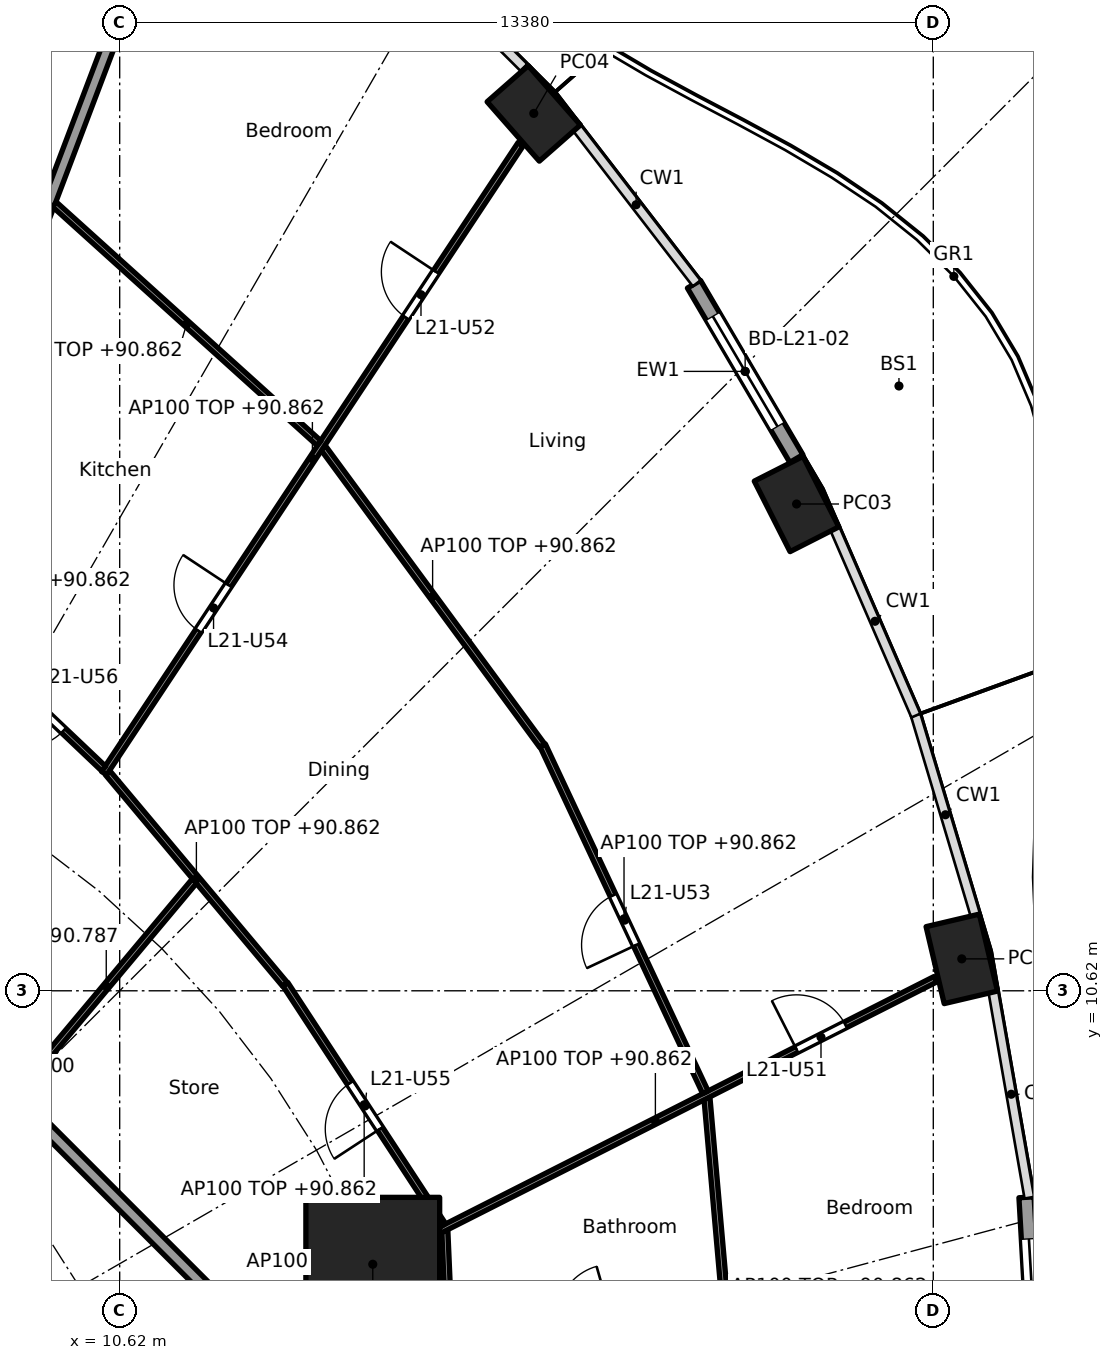
"""IFC4 building model, lengths in metres.
Left out: names, types, materials, properties, quantities, classifications, styles, units other than length and angle.
Written with IfcOpenShell. Run it as: python <this file> out.ifc"""

import sys

from ifc_helpers import new_model, si_unit, direction, frame, frame_2d, origin, origin_2d, place, context, subcontext, project, spatial, rectangle, hollow_rectangle, extrude, element, fill, save


model = new_model("IFC4")
c1 = context("Model", 3, precision=1e-05, world=origin(), true_north=direction((0.0, 1.0)))
c2 = subcontext(c1, "Body", "Model", "MODEL_VIEW")
j1 = project(units=[si_unit("LENGTHUNIT", "METRE"), si_unit("PLANEANGLEUNIT", "RADIAN")], contexts=[c1])
p1 = place(None, origin())
s1 = spatial("IfcSite", under=j1, at=p1, CompositionType="ELEMENT")
p2 = place(p1, origin())
s2 = spatial("IfcBuilding", under=s1, at=p2, CompositionType="ELEMENT")
p3 = place(p2, frame((0.0, 0.0, 88.1)))
s3 = spatial("IfcBuildingStorey", under=s2, at=p3, CompositionType="ELEMENT", Elevation=88.1)
for number, where, z_axis, x_axis in (
    (1, (24.468, 11.145, 0.0), (0.0, 0.0, 1.0), (-0.229, 0.973, 0.0)),
    (2, (21.751, 18.625, 0.0), (0.0, 0.0, 1.0), (-0.452, 0.892, 0.0)),
    (3, (17.43, 25.049, 0.0), (0.0, 0.0, 1.0), (-0.66, 0.751, 0.0)),
):
    element("IfcColumn", number, at=place(p3, frame(where, z_axis=z_axis, x_axis=x_axis)), inside=s3, PredefinedType="COLUMN", context=c2, shape_type="SweptSolid", body=[
        extrude(hollow_rectangle(XDim=1.3, YDim=0.9, WallThickness=0.045, at=origin_2d()), origin(), (0.0, 0.0, 1.0), 3.7),
    ])
p4 = place(p3, frame((14.782, 6.123, 0.0), z_axis=(0.0, 0.0, 1.0), x_axis=(1.0, 0.0, 0.0)))
e4 = element("IfcColumn", 4, at=p4, inside=s3, PredefinedType="COLUMN", context=c2, shape_type="SweptSolid", body=[
    extrude(rectangle(XDim=2.2, YDim=2.2, at=origin_2d()), origin(), (0.0, 0.0, 1.0), 3.7),
])
p5 = place(p3, frame((25.533, 7.224, 0.0), z_axis=(0.0, 0.0, 1.0), x_axis=(0.057546644052, -0.998342818754, 0.0)))
e5 = element("IfcWall", 5, at=p5, inside=s3, PredefinedType="SOLIDWALL", context=c2, shape_type="SweptSolid", body=[
    extrude(rectangle(XDim=3.47, YDim=0.25, at=frame_2d((1.735, 0.0))), origin(), (0.0, 0.0, 1.0), 3.44),
])
p6 = place(p5, frame((0.685, 0.0, 0.0)))
e6 = element("IfcOpeningElement", 6, at=p6, cuts=e5, PredefinedType="OPENING", context=c2, shape_type="SweptSolid", body=[
    extrude(rectangle(XDim=2.1, YDim=2.4, at=frame_2d((1.05, 1.2))), frame((0.0, 0.135, 0.0), z_axis=(0.0, -1.0, 0.0), x_axis=(1.0, 0.0, 0.0)), (0.0, 0.0, 1.0), 0.27),
])
p7 = place(p3, frame((20.064, 22.24, 0.0), z_axis=(0.0, 0.0, 1.0), x_axis=(0.506297921217, -0.862358634775, 0.0)))
e7 = element("IfcWall", 7, at=p7, inside=s3, PredefinedType="SOLIDWALL", context=c2, shape_type="SweptSolid", body=[
    extrude(rectangle(XDim=3.325, YDim=0.25, at=frame_2d((1.662, 0.0))), origin(), (0.0, 0.0, 1.0), 3.44),
])
p8 = place(p7, frame((0.612, 0.0, 0.0)))
e8 = element("IfcOpeningElement", 8, at=p8, cuts=e7, PredefinedType="OPENING", context=c2, shape_type="SweptSolid", body=[
    extrude(rectangle(XDim=2.1, YDim=2.4, at=frame_2d((1.05, 1.2))), frame((0.0, 0.135, 0.0), z_axis=(0.0, -1.0, 0.0), x_axis=(1.0, 0.0, 0.0)), (0.0, 0.0, 1.0), 0.27),
])
p9 = place(p3, frame((9.988, 4.613, 0.0), z_axis=(0.0, 0.0, 1.0), x_axis=(-0.707106781187, 0.707106781187, 0.0)))
e9 = element("IfcWall", 9, at=p9, inside=s3, PredefinedType="SHEAR", context=c2, shape_type="SweptSolid", body=[
    extrude(rectangle(XDim=7.602, YDim=0.6, at=frame_2d((3.801, 0.0))), origin(), (0.0, 0.0, 1.0), 3.44),
])
p10 = place(p9, frame((3.201, 0.0, 0.0)))
e10 = element("IfcOpeningElement", 10, at=p10, cuts=e9, PredefinedType="OPENING", context=c2, shape_type="SweptSolid", body=[
    extrude(rectangle(XDim=1.2, YDim=2.1, at=frame_2d((0.6, 1.05))), frame((0.0, 0.31, 0.0), z_axis=(0.0, -1.0, 0.0), x_axis=(1.0, 0.0, 0.0)), (0.0, 0.0, 1.0), 0.62),
])
p11 = place(p3, frame((6.141, 14.829, 0.0), z_axis=(0.0, 0.0, 1.0), x_axis=(0.354477134193, 0.935064682968, 0.0)))
e11 = element("IfcWall", 11, at=p11, inside=s3, PredefinedType="PARTITIONING", context=c2, shape_type="SweptSolid", body=[
    extrude(rectangle(XDim=15.626, YDim=0.2, at=frame_2d((7.813, 0.0))), origin(), (0.0, 0.0, 1.0), 2.762),
])
p12 = place(p3, frame((12.635, 5.134, 0.0), z_axis=(0.0, 0.0, 1.0), x_axis=(-0.707106781187, 0.707106781187, 0.0)))
e12 = element("IfcWall", 12, at=p12, inside=s3, PredefinedType="PARTITIONING", context=c2, shape_type="SweptSolid", body=[
    extrude(rectangle(XDim=10.609, YDim=0.2, at=frame_2d((5.305, 0.0))), origin(), (0.0, 0.0, 1.0), 3.44),
])
p13 = place(p3, frame((20.825, 2.642, 0.0), z_axis=(0.0, 0.0, 1.0), x_axis=(-0.08776129045, 0.99614153407, 0.0)))
e13 = element("IfcWall", 13, at=p13, inside=s3, PredefinedType="PARTITIONING", context=c2, shape_type="SweptSolid", body=[
    extrude(rectangle(XDim=6.237, YDim=0.1, at=frame_2d((3.119, 0.0))), origin(), (0.0, 0.0, 1.0), 2.762),
])
p14 = place(p3, frame((16.064, 4.415, 0.0), z_axis=(0.0, 0.0, 1.0), x_axis=(-0.043118325477, 0.999069972528, 0.0)))
e14 = element("IfcWall", 14, at=p14, inside=s3, PredefinedType="PARTITIONING", context=c2, shape_type="SweptSolid", body=[
    extrude(rectangle(XDim=2.259, YDim=0.1, at=frame_2d((1.13, 0.0))), origin(), (0.0, 0.0, 1.0), 3.44),
])
p15 = place(p3, frame((12.657, 5.243, 0.0), z_axis=(0.0, 0.0, 1.0), x_axis=(0.923848837015, 0.382757529444, 0.0)))
e15 = element("IfcWall", 15, at=p15, inside=s3, PredefinedType="PARTITIONING", context=c2, shape_type="SweptSolid", body=[
    extrude(rectangle(XDim=2.25, YDim=0.1, at=frame_2d((1.125, 0.0))), origin(), (0.0, 0.0, 1.0), 3.44),
])
p16 = place(p3, frame((14.827, 6.146, 0.0), z_axis=(0.0, 0.0, 1.0), x_axis=(0.892068075337, 0.451901038906, 0.0)))
e16 = element("IfcWall", 16, at=p16, inside=s3, PredefinedType="PARTITIONING", context=c2, shape_type="SweptSolid", body=[
    extrude(rectangle(XDim=10.32, YDim=0.1, at=frame_2d((5.16, 0.0))), origin(), (0.0, 0.0, 1.0), 2.762),
])
p17 = place(p16, frame((7.763, 0.0, 0.0)))
e17 = element("IfcOpeningElement", 17, at=p17, cuts=e16, PredefinedType="OPENING", context=c2, shape_type="SweptSolid", body=[
    extrude(rectangle(XDim=0.9, YDim=2.1, at=frame_2d((0.45, 1.05))), frame((0.0, 0.06, 0.0), z_axis=(0.0, -1.0, 0.0), x_axis=(1.0, 0.0, 0.0)), (0.0, 0.0, 1.0), 0.12),
])
p18 = place(p3, frame((15.938, 6.764, 0.0), z_axis=(0.0, 0.0, 1.0), x_axis=(-0.547472878942, 0.836823426311, 0.0)))
e18 = element("IfcWall", 18, at=p18, inside=s3, PredefinedType="PARTITIONING", context=c2, shape_type="SweptSolid", body=[
    extrude(rectangle(XDim=4.738, YDim=0.1, at=frame_2d((2.369, 0.0))), origin(), (0.0, 0.0, 1.0), 2.762),
])
p19 = place(p18, frame((1.894, 0.0, 0.0)))
e19 = element("IfcOpeningElement", 19, at=p19, cuts=e18, PredefinedType="OPENING", context=c2, shape_type="SweptSolid", body=[
    extrude(rectangle(XDim=0.9, YDim=2.1, at=frame_2d((0.45, 1.05))), frame((0.0, 0.06, 0.0), z_axis=(0.0, -1.0, 0.0), x_axis=(1.0, 0.0, 0.0)), (0.0, 0.0, 1.0), 0.12),
])
p20 = place(p3, frame((20.252, 8.95, 0.0), z_axis=(0.0, 0.0, 1.0), x_axis=(-0.424580709335, 0.905390093419, 0.0)))
e20 = element("IfcWall", 20, at=p20, inside=s3, PredefinedType="PARTITIONING", context=c2, shape_type="SweptSolid", body=[
    extrude(rectangle(XDim=6.304, YDim=0.1, at=frame_2d((3.152, 0.0))), origin(), (0.0, 0.0, 1.0), 2.762),
])
p21 = place(p20, frame((2.677, 0.0, 0.0)))
e21 = element("IfcOpeningElement", 21, at=p21, cuts=e20, PredefinedType="OPENING", context=c2, shape_type="SweptSolid", body=[
    extrude(rectangle(XDim=0.9, YDim=2.1, at=frame_2d((0.45, 1.05))), frame((0.0, 0.06, 0.0), z_axis=(0.0, -1.0, 0.0), x_axis=(1.0, 0.0, 0.0)), (0.0, 0.0, 1.0), 0.12),
])
p22 = place(p3, frame((13.339, 10.725, 0.0), z_axis=(0.0, 0.0, 1.0), x_axis=(-0.642515455924, 0.766272724882, 0.0)))
e22 = element("IfcWall", 22, at=p22, inside=s3, PredefinedType="PARTITIONING", context=c2, shape_type="SweptSolid", body=[
    extrude(rectangle(XDim=4.537, YDim=0.1, at=frame_2d((2.269, 0.0))), origin(), (0.0, 0.0, 1.0), 2.762),
])
p23 = place(p3, frame((17.567, 14.653, 0.0), z_axis=(0.0, 0.0, 1.0), x_axis=(-0.592391983588, 0.80564988536, 0.0)))
e23 = element("IfcWall", 23, at=p23, inside=s3, PredefinedType="PARTITIONING", context=c2, shape_type="SweptSolid", body=[
    extrude(rectangle(XDim=6.08, YDim=0.1, at=frame_2d((3.04, 0.0))), origin(), (0.0, 0.0, 1.0), 2.762),
])
p24 = place(p3, frame((8.949, 8.961, 0.0), z_axis=(0.0, 0.0, 1.0), x_axis=(0.642048217601, 0.766664259162, 0.0)))
e24 = element("IfcWall", 24, at=p24, inside=s3, PredefinedType="PARTITIONING", context=c2, shape_type="SweptSolid", body=[
    extrude(rectangle(XDim=4.518, YDim=0.1, at=frame_2d((2.259, 0.0))), origin(), (0.0, 0.0, 1.0), 2.687),
])
p25 = place(p3, frame((10.364, 14.198, 0.0), z_axis=(0.0, 0.0, 1.0), x_axis=(0.552104552927, 0.833774887267, 0.0)))
e25 = element("IfcWall", 25, at=p25, inside=s3, PredefinedType="PARTITIONING", context=c2, shape_type="SweptSolid", body=[
    extrude(rectangle(XDim=12.407, YDim=0.1, at=frame_2d((6.203, 0.0))), origin(), (0.0, 0.0, 1.0), 2.762),
])
p26 = place(p25, frame((8.988, 0.0, 0.0)))
e26 = element("IfcOpeningElement", 26, at=p26, cuts=e25, PredefinedType="OPENING", context=c2, shape_type="SweptSolid", body=[
    extrude(rectangle(XDim=0.9, YDim=2.1, at=frame_2d((0.45, 1.05))), frame((0.0, 0.06, 0.0), z_axis=(0.0, -1.0, 0.0), x_axis=(1.0, 0.0, 0.0)), (0.0, 0.0, 1.0), 0.12),
])
p27 = place(p25, frame((2.809, 0.0, 0.0)))
e27 = element("IfcOpeningElement", 27, at=p27, cuts=e25, PredefinedType="OPENING", context=c2, shape_type="SweptSolid", body=[
    extrude(rectangle(XDim=0.9, YDim=2.1, at=frame_2d((0.45, 1.05))), frame((0.0, 0.06, 0.0), z_axis=(0.0, -1.0, 0.0), x_axis=(1.0, 0.0, 0.0)), (0.0, 0.0, 1.0), 0.12),
])
p28 = place(p3, frame((10.355, 14.274, 0.0), z_axis=(0.0, 0.0, 1.0), x_axis=(-0.725206433622, 0.688531501555, 0.0)))
e28 = element("IfcWall", 28, at=p28, inside=s3, PredefinedType="PARTITIONING", context=c2, shape_type="SweptSolid", body=[
    extrude(rectangle(XDim=4.387, YDim=0.1, at=frame_2d((2.193, 0.0))), origin(), (0.0, 0.0, 1.0), 2.762),
])
p29 = place(p28, frame((0.907, 0.0, 0.0)))
e29 = element("IfcOpeningElement", 29, at=p29, cuts=e28, PredefinedType="OPENING", context=c2, shape_type="SweptSolid", body=[
    extrude(rectangle(XDim=0.9, YDim=2.1, at=frame_2d((0.45, 1.05))), frame((0.0, 0.06, 0.0), z_axis=(0.0, -1.0, 0.0), x_axis=(1.0, 0.0, 0.0)), (0.0, 0.0, 1.0), 0.12),
])
p30 = place(p3, frame((13.898, 19.625, 0.0), z_axis=(0.0, 0.0, 1.0), x_axis=(-0.742396654702, 0.669960601146, 0.0)))
e30 = element("IfcWall", 30, at=p30, inside=s3, PredefinedType="PARTITIONING", context=c2, shape_type="SweptSolid", body=[
    extrude(rectangle(XDim=5.861, YDim=0.1, at=frame_2d((2.931, 0.0))), origin(), (0.0, 0.0, 1.0), 2.762),
])
p31 = place(p6, origin())
e31 = element("IfcDoor", 31, at=p31, inside=s3, OperationType="SLIDING_TO_LEFT", PredefinedType="DOOR", context=c2, shape_type="SweptSolid", body=[
    extrude(rectangle(XDim=2.1, YDim=2.4, at=frame_2d((1.05, 1.2))), frame((0.0, 0.025, 0.0), z_axis=(0.0, -1.0, 0.0), x_axis=(1.0, 0.0, 0.0)), (0.0, 0.0, 1.0), 0.05),
])
fill(e6, e31)
p32 = place(p8, origin())
e32 = element("IfcDoor", 32, at=p32, inside=s3, OperationType="SLIDING_TO_LEFT", PredefinedType="DOOR", context=c2, shape_type="SweptSolid", body=[
    extrude(rectangle(XDim=2.1, YDim=2.4, at=frame_2d((1.05, 1.2))), frame((0.0, 0.025, 0.0), z_axis=(0.0, -1.0, 0.0), x_axis=(1.0, 0.0, 0.0)), (0.0, 0.0, 1.0), 0.05),
])
fill(e8, e32)
p33 = place(p17, origin())
e33 = element("IfcDoor", 33, at=p33, inside=s3, OperationType="SINGLE_SWING_LEFT", PredefinedType="DOOR", context=c2, shape_type="SweptSolid", body=[
    extrude(rectangle(XDim=0.9, YDim=2.1, at=frame_2d((0.45, 1.05))), frame((0.0, 0.025, 0.0), z_axis=(0.0, -1.0, 0.0), x_axis=(1.0, 0.0, 0.0)), (0.0, 0.0, 1.0), 0.05),
])
fill(e17, e33)
p34 = place(p26, origin())
e34 = element("IfcDoor", 34, at=p34, inside=s3, OperationType="SINGLE_SWING_RIGHT", PredefinedType="DOOR", context=c2, shape_type="SweptSolid", body=[
    extrude(rectangle(XDim=0.9, YDim=2.1, at=frame_2d((0.45, 1.05))), frame((0.0, 0.025, 0.0), z_axis=(0.0, -1.0, 0.0), x_axis=(1.0, 0.0, 0.0)), (0.0, 0.0, 1.0), 0.05),
])
fill(e26, e34)
p35 = place(p21, origin())
e35 = element("IfcDoor", 35, at=p35, inside=s3, OperationType="SINGLE_SWING_LEFT", PredefinedType="DOOR", context=c2, shape_type="SweptSolid", body=[
    extrude(rectangle(XDim=0.9, YDim=2.1, at=frame_2d((0.45, 1.05))), frame((0.0, 0.025, 0.0), z_axis=(0.0, -1.0, 0.0), x_axis=(1.0, 0.0, 0.0)), (0.0, 0.0, 1.0), 0.05),
])
fill(e21, e35)
p36 = place(p27, origin())
e36 = element("IfcDoor", 36, at=p36, inside=s3, OperationType="SINGLE_SWING_RIGHT", PredefinedType="DOOR", context=c2, shape_type="SweptSolid", body=[
    extrude(rectangle(XDim=0.9, YDim=2.1, at=frame_2d((0.45, 1.05))), frame((0.0, 0.025, 0.0), z_axis=(0.0, -1.0, 0.0), x_axis=(1.0, 0.0, 0.0)), (0.0, 0.0, 1.0), 0.05),
])
fill(e27, e36)
p37 = place(p19, origin())
e37 = element("IfcDoor", 37, at=p37, inside=s3, OperationType="SINGLE_SWING_LEFT", PredefinedType="DOOR", context=c2, shape_type="SweptSolid", body=[
    extrude(rectangle(XDim=0.9, YDim=2.1, at=frame_2d((0.45, 1.05))), frame((0.0, 0.025, 0.0), z_axis=(0.0, -1.0, 0.0), x_axis=(1.0, 0.0, 0.0)), (0.0, 0.0, 1.0), 0.05),
])
fill(e19, e37)
p38 = place(p29, origin())
e38 = element("IfcDoor", 38, at=p38, inside=s3, OperationType="SINGLE_SWING_RIGHT", PredefinedType="DOOR", context=c2, shape_type="SweptSolid", body=[
    extrude(rectangle(XDim=0.9, YDim=2.1, at=frame_2d((0.45, 1.05))), frame((0.0, 0.025, 0.0), z_axis=(0.0, -1.0, 0.0), x_axis=(1.0, 0.0, 0.0)), (0.0, 0.0, 1.0), 0.05),
])
fill(e29, e38)
save(model, sys.argv[1])
